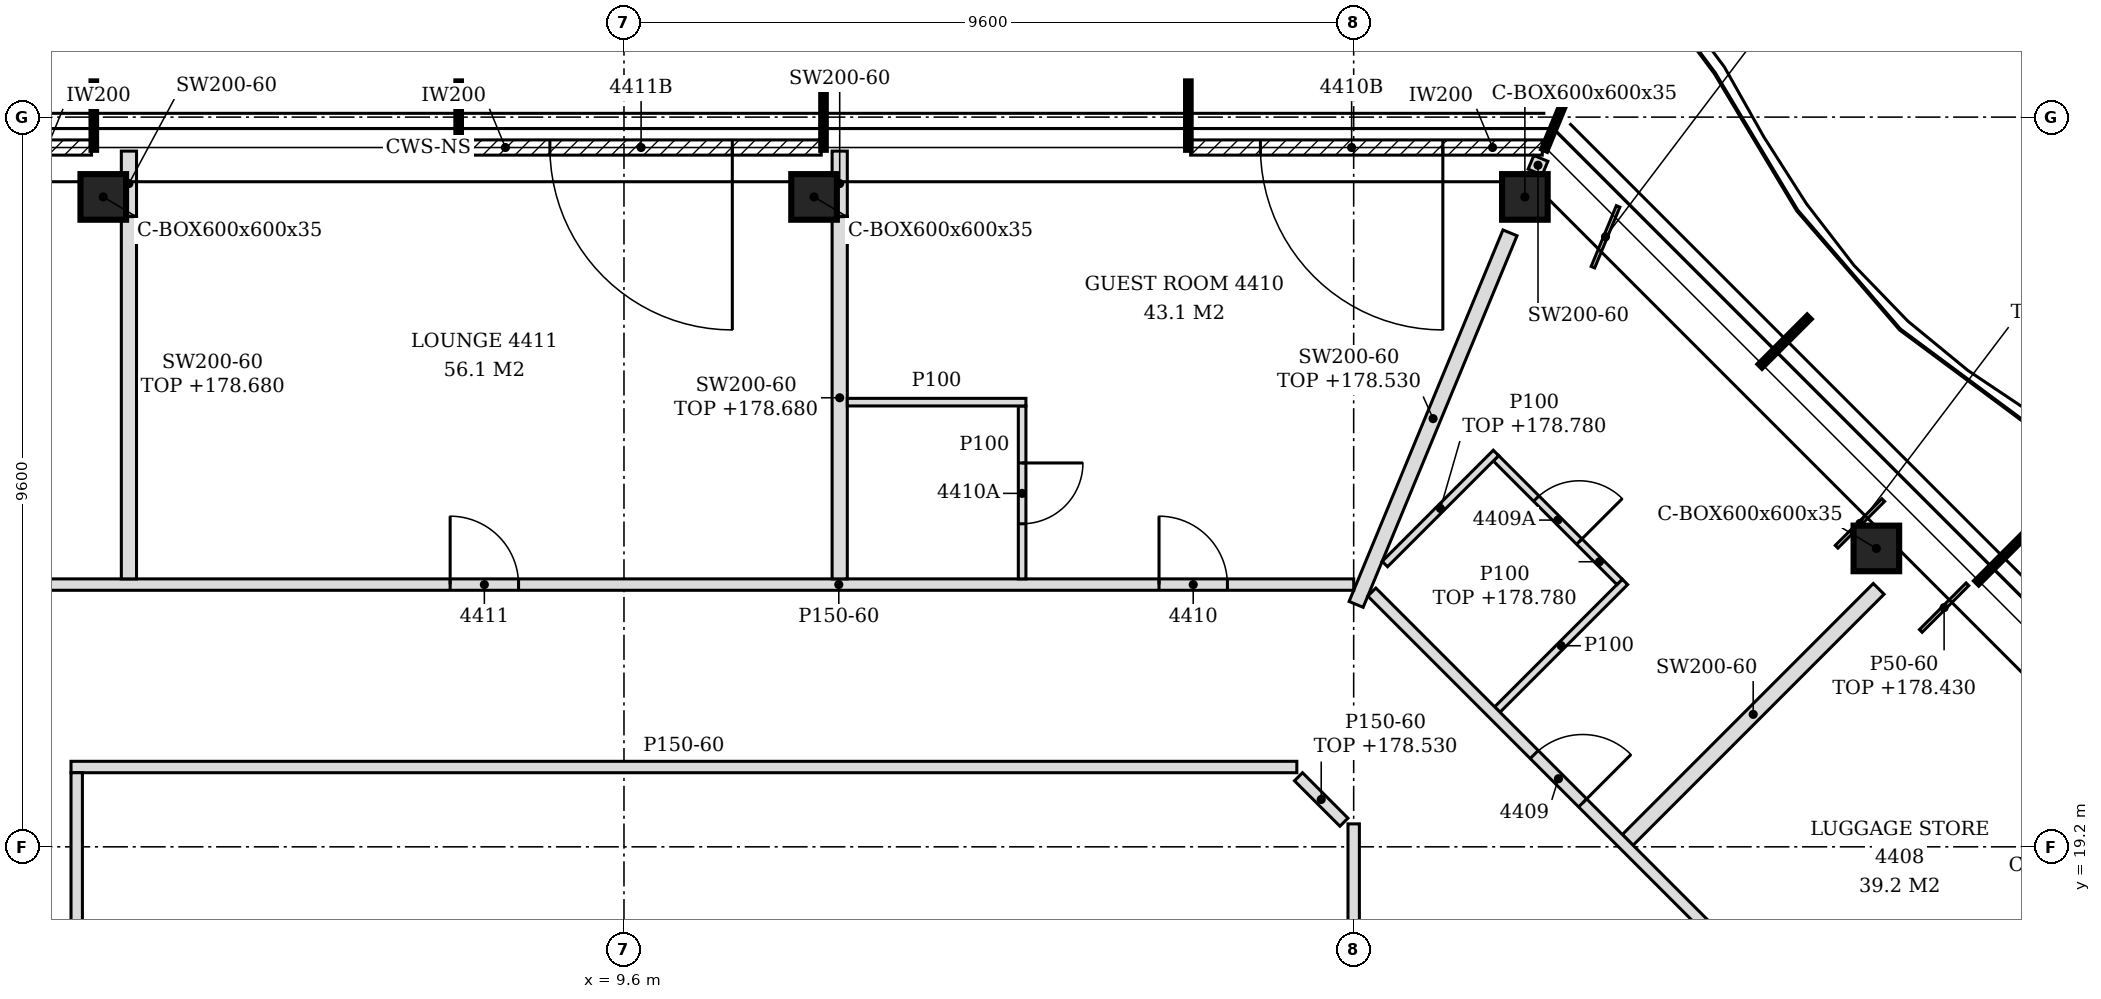
"""IFC4 building model, lengths in metres.
Left out: names, types, materials, properties, quantities, classifications, styles, units other than length and angle.
Written with IfcOpenShell. Run it as: python <this file> out.ifc"""

import sys

from ifc_helpers import new_model, si_unit, direction, frame, frame_2d, origin, origin_2d, place, context, subcontext, project, spatial, polyline, rectangle, hollow_rectangle, outline, extrude, clip, halfspace, element, fill, save


model = new_model("IFC4")
c1 = context("Model", 3, precision=1e-05, world=origin(), true_north=direction((0.0, 1.0)))
c2 = subcontext(c1, "Body", "Model", "MODEL_VIEW")
j1 = project(units=[si_unit("LENGTHUNIT", "METRE"), si_unit("PLANEANGLEUNIT", "RADIAN")], contexts=[c1])
p1 = place(None, origin())
s1 = spatial("IfcSite", under=j1, at=p1, CompositionType="ELEMENT")
p2 = place(p1, origin())
s2 = spatial("IfcBuilding", under=s1, at=p2, CompositionType="ELEMENT")
p3 = place(p2, frame((0.0, 0.0, 175.8)))
s3 = spatial("IfcBuildingStorey", under=s2, at=p3, CompositionType="ELEMENT", Elevation=175.8)
for number, where, z_axis, x_axis in (
    (1, (26.076, 23.126, -0.15), (0.183, -0.122, 0.976), (0.555, 0.832, 0.0)),
    (2, (21.452, 27.75, -0.15), (0.183, -0.122, 0.976), (0.555, 0.832, 0.0)),
    (3, (12.101, 27.75, -0.15), (0.183, -0.122, 0.976), (0.555, 0.832, 0.0)),
    (4, (2.749, 27.75, -0.15), (0.183, -0.122, 0.976), (0.555, 0.832, 0.0)),
):
    element("IfcColumn", number, at=place(p3, frame(where, z_axis=z_axis, x_axis=x_axis)), inside=s3, PredefinedType="COLUMN", context=c2, shape_type="Clipping", body=[
        clip(clip(extrude(hollow_rectangle(XDim=0.6, YDim=0.6, WallThickness=0.035, at=origin_2d()), origin(), (0.0, 0.0, 1.0), 3.69), halfspace(frame((0.0, 0.0, 0.022), z_axis=(0.0, 0.0, 1.0), x_axis=(1.0, 0.0, 0.0)), True)), halfspace(frame((0.0, 0.0, 3.67), z_axis=(0.0, 0.0, 1.0), x_axis=(1.0, 0.0, 0.0)), False)),
    ])
p4 = place(p3, frame((21.681, 28.4, 0.0), z_axis=(0.0, 0.0, 1.0), x_axis=(-1.0, 0.0, 0.0)))
e5 = element("IfcWall", 5, at=p4, inside=s3, PredefinedType="NOTDEFINED", context=c2, shape_type="SweptSolid", body=[
    extrude(rectangle(XDim=4.626, YDim=0.2, at=frame_2d((2.313, 0.0))), origin(), (0.0, 0.0, 1.0), 3.45),
])
p5 = place(p4, frame((1.308, 0.0, 0.0)))
e6 = element("IfcOpeningElement", 6, at=p5, cuts=e5, PredefinedType="OPENING", context=c2, shape_type="SweptSolid", body=[
    extrude(rectangle(XDim=2.4, YDim=2.4, at=frame_2d((1.2, 1.2))), frame((0.0, 0.11, 0.0), z_axis=(0.0, -1.0, 0.0), x_axis=(1.0, 0.0, 0.0)), (0.0, 0.0, 1.0), 0.22),
])
p6 = place(p3, frame((12.195, 28.4, 0.0), z_axis=(0.0, 0.0, 1.0), x_axis=(-1.0, 0.0, 0.0)))
e7 = element("IfcWall", 7, at=p6, inside=s3, PredefinedType="NOTDEFINED", context=c2, shape_type="SweptSolid", body=[
    extrude(rectangle(XDim=4.74, YDim=0.2, at=frame_2d((2.37, 0.0))), origin(), (0.0, 0.0, 1.0), 3.45),
])
p7 = place(p6, frame((1.17, 0.0, 0.0)))
e8 = element("IfcOpeningElement", 8, at=p7, cuts=e7, PredefinedType="OPENING", context=c2, shape_type="SweptSolid", body=[
    extrude(rectangle(XDim=2.4, YDim=2.4, at=frame_2d((1.2, 1.2))), frame((0.0, 0.11, 0.0), z_axis=(0.0, -1.0, 0.0), x_axis=(1.0, 0.0, 0.0)), (0.0, 0.0, 1.0), 0.22),
])
p8 = place(p3, frame((2.595, 28.4, 0.0), z_axis=(0.0, 0.0, 1.0), x_axis=(-1.0, 0.0, 0.0)))
e9 = element("IfcWall", 9, at=p8, inside=s3, PredefinedType="NOTDEFINED", context=c2, shape_type="SweptSolid", body=[
    extrude(rectangle(XDim=4.74, YDim=0.2, at=frame_2d((2.37, 0.0))), origin(), (0.0, 0.0, 1.0), 3.45),
])
p9 = place(p8, frame((1.17, 0.0, 0.0)))
e10 = element("IfcOpeningElement", 10, at=p9, cuts=e9, PredefinedType="OPENING", context=c2, shape_type="SweptSolid", body=[
    extrude(rectangle(XDim=2.4, YDim=2.4, at=frame_2d((1.2, 1.2))), frame((0.0, 0.11, 0.0), z_axis=(0.0, -1.0, 0.0), x_axis=(1.0, 0.0, 0.0)), (0.0, 0.0, 1.0), 0.22),
])
p10 = place(p3, frame((31.072, 10.918, 0.0), z_axis=(0.0, 0.0, 1.0), x_axis=(-0.707106781187, 0.707106781187, 0.0)))
e11 = element("IfcWall", 11, at=p10, inside=s3, PredefinedType="PARTITIONING", context=c2, shape_type="SweptSolid", body=[
    extrude(rectangle(XDim=16.452, YDim=0.15, at=frame_2d((8.226, 0.0))), origin(), (0.0, 0.0, 1.0), 2.88),
])
p11 = place(p10, frame((3.462, 0.0, 0.0)))
e12 = element("IfcOpeningElement", 12, at=p11, cuts=e11, PredefinedType="OPENING", context=c2, shape_type="SweptSolid", body=[
    extrude(rectangle(XDim=0.9, YDim=2.1, at=frame_2d((0.45, 1.05))), frame((0.0, 0.085, 0.0), z_axis=(0.0, -1.0, 0.0), x_axis=(1.0, 0.0, 0.0)), (0.0, 0.0, 1.0), 0.17),
])
p12 = place(p10, frame((8.046, 0.0, 0.0)))
e13 = element("IfcOpeningElement", 13, at=p12, cuts=e11, PredefinedType="OPENING", context=c2, shape_type="SweptSolid", body=[
    extrude(rectangle(XDim=0.9, YDim=2.1, at=frame_2d((0.45, 1.05))), frame((0.0, 0.085, 0.0), z_axis=(0.0, -1.0, 0.0), x_axis=(1.0, 0.0, 0.0)), (0.0, 0.0, 1.0), 0.17),
])
p13 = place(p10, frame((12.53, 0.0, 0.0)))
e14 = element("IfcOpeningElement", 14, at=p13, cuts=e11, PredefinedType="OPENING", context=c2, shape_type="SweptSolid", body=[
    extrude(rectangle(XDim=0.9, YDim=2.1, at=frame_2d((0.45, 1.05))), frame((0.0, 0.085, 0.0), z_axis=(0.0, -1.0, 0.0), x_axis=(1.0, 0.0, 0.0)), (0.0, 0.0, 1.0), 0.17),
])
p14 = place(p3, frame((2.4, 13.275, 0.0), z_axis=(0.0, 0.0, 1.0), x_axis=(0.0, 1.0, 0.0)))
e15 = element("IfcWall", 15, at=p14, inside=s3, PredefinedType="PARTITIONING", context=c2, shape_type="SweptSolid", body=[
    extrude(outline(polyline([(0.0, 0.0), (6.9, 0.0), (6.9, 3.45), (5.43, 3.45), (5.428, 2.88), (5.22, 2.88), (5.218, 3.45), (0.075, 3.45), (0.073, 2.83), (0.0, 2.83), (0.0, 0.0)])), frame((0.0, 0.075, 0.0), z_axis=(0.0, -1.0, 0.0), x_axis=(1.0, 0.0, 0.0)), (0.0, 0.0, 1.0), 0.15),
])
p15 = place(p3, frame((19.2, 15.502, 0.0), z_axis=(0.0, 0.0, 1.0), x_axis=(0.0, 1.0, 0.0)))
e16 = element("IfcWall", 16, at=p15, inside=s3, PredefinedType="PARTITIONING", context=c2, shape_type="SweptSolid", body=[
    extrude(rectangle(XDim=4.0, YDim=0.15, at=frame_2d((2.0, 0.0))), origin(), (0.0, 0.0, 1.0), 2.73),
])
p16 = place(p3, frame((22.805, 19.291, 0.0), z_axis=(0.0, 0.0, 1.0), x_axis=(0.707028369139, 0.70718518454, 0.0)))
e17 = element("IfcWall", 17, at=p16, inside=s3, PredefinedType="PARTITIONING", context=c2, shape_type="SweptSolid", body=[
    extrude(rectangle(XDim=4.671, YDim=0.2, at=frame_2d((2.335, 0.0))), origin(), (0.0, 0.0, 1.0), 3.45),
])
p17 = place(p3, frame((19.072, 19.524, 0.0), z_axis=(0.0, 0.0, 1.0), x_axis=(-0.706962429495, 0.707251103415, 0.0)))
e18 = element("IfcWall", 18, at=p17, inside=s3, PredefinedType="PARTITIONING", context=c2, shape_type="SweptSolid", body=[
    extrude(rectangle(XDim=0.846, YDim=0.15, at=frame_2d((0.423, 0.0))), origin(), (0.0, 0.0, 1.0), 2.73),
])
p18 = place(p3, frame((2.325, 20.25, 0.0), z_axis=(0.0, 0.0, 1.0), x_axis=(1.0, 0.0, 0.0)))
e19 = element("IfcWall", 19, at=p18, inside=s3, PredefinedType="PARTITIONING", context=c2, shape_type="SweptSolid", body=[
    extrude(outline(polyline([(0.0, 0.0), (16.127, 0.0), (16.127, 3.45), (5.025, 3.45), (5.023, 2.73), (4.725, 2.73), (4.723, 3.45), (0.0, 3.45), (0.0, 0.0)])), frame((0.0, 0.075, 0.0), z_axis=(0.0, -1.0, 0.0), x_axis=(1.0, 0.0, 0.0)), (0.0, 0.0, 1.0), 0.15),
])
p19 = place(p3, frame((21.09, 21.006, 0.0), z_axis=(0.0, 0.0, 1.0), x_axis=(0.707106781187, 0.707106781187, 0.0)))
e20 = element("IfcWall", 20, at=p19, inside=s3, PredefinedType="PARTITIONING", context=c2, shape_type="SweptSolid", body=[
    extrude(rectangle(XDim=2.375, YDim=0.1, at=frame_2d((1.188, 0.0))), origin(), (0.0, 0.0, 1.0), 3.45),
])
p20 = place(p3, frame((19.232, 22.389, 0.0), z_axis=(0.0, 0.0, 1.0), x_axis=(0.382645235891, 0.923895353084, 0.0)))
e21 = element("IfcWall", 21, at=p20, inside=s3, PredefinedType="PARTITIONING", context=c2, shape_type="SweptSolid", body=[
    extrude(rectangle(XDim=5.291, YDim=0.2, at=frame_2d((2.645, 0.0))), origin(), (0.0, 0.0, 1.0), 2.73),
])
p21 = place(p3, frame((-4.351, 22.65, 0.0), z_axis=(0.0, 0.0, 1.0), x_axis=(1.0, 0.0, 0.0)))
e22 = element("IfcWall", 22, at=p21, inside=s3, PredefinedType="PARTITIONING", context=c2, shape_type="SweptSolid", body=[
    extrude(outline(polyline([(0.0, 0.0), (23.551, 0.0), (23.552, 2.73), (23.401, 2.73), (23.399, 3.45), (11.701, 3.45), (11.699, 2.73), (11.401, 2.73), (11.399, 3.45), (0.0, 3.45), (0.0, 0.0)])), frame((0.0, 0.075, 0.0), z_axis=(0.0, -1.0, 0.0), x_axis=(1.0, 0.0, 0.0)), (0.0, 0.0, 1.0), 0.15),
])
p22 = place(p21, frame((20.99, 0.0, 0.0)))
e23 = element("IfcOpeningElement", 23, at=p22, cuts=e22, PredefinedType="OPENING", context=c2, shape_type="SweptSolid", body=[
    extrude(rectangle(XDim=0.9, YDim=2.1, at=frame_2d((0.45, 1.05))), frame((0.0, 0.085, 0.0), z_axis=(0.0, -1.0, 0.0), x_axis=(1.0, 0.0, 0.0)), (0.0, 0.0, 1.0), 0.17),
])
p23 = place(p21, frame((11.664, 0.0, 0.0)))
e24 = element("IfcOpeningElement", 24, at=p23, cuts=e22, PredefinedType="OPENING", context=c2, shape_type="SweptSolid", body=[
    extrude(rectangle(XDim=0.9, YDim=2.1, at=frame_2d((0.45, 1.05))), frame((0.0, 0.085, 0.0), z_axis=(0.0, -1.0, 0.0), x_axis=(1.0, 0.0, 0.0)), (0.0, 0.0, 1.0), 0.17),
])
p24 = place(p21, frame((4.399, 0.0, 0.0)))
e25 = element("IfcOpeningElement", 25, at=p24, cuts=e22, PredefinedType="OPENING", context=c2, shape_type="SweptSolid", body=[
    extrude(rectangle(XDim=0.9, YDim=2.1, at=frame_2d((0.45, 1.05))), frame((0.0, 0.085, 0.0), z_axis=(0.0, -1.0, 0.0), x_axis=(1.0, 0.0, 0.0)), (0.0, 0.0, 1.0), 0.17),
])
p25 = place(p3, frame((3.087, 22.725, 0.0), z_axis=(0.0, 0.0, 1.0), x_axis=(0.0, 1.0, 0.0)))
e26 = element("IfcWall", 26, at=p25, inside=s3, PredefinedType="PARTITIONING", context=c2, shape_type="SweptSolid", body=[
    extrude(outline(polyline([(0.0, 0.0), (4.766, 0.0), (4.478, 0.863), (4.373, 1.725), (4.373, 2.587), (4.373, 2.88), (0.0, 2.88), (0.0, 2.587), (0.0, 1.725), (0.0, 0.863), (0.0, 0.0)])), frame((0.0, 0.1, 0.0), z_axis=(0.0, -1.0, 0.0), x_axis=(1.0, 0.0, 0.0)), (0.0, 0.0, 1.0), 0.2),
])
p26 = place(p3, frame((12.438, 22.725, 0.0), z_axis=(0.0, 0.0, 1.0), x_axis=(0.0, 1.0, 0.0)))
e27 = element("IfcWall", 27, at=p26, inside=s3, PredefinedType="PARTITIONING", context=c2, shape_type="SweptSolid", body=[
    extrude(outline(polyline([(0.0, 0.0), (4.766, 0.0), (4.478, 0.863), (4.373, 1.725), (4.373, 2.587), (4.373, 2.88), (0.0, 2.88), (0.0, 2.587), (0.0, 1.725), (0.0, 0.863), (0.0, 0.0)])), frame((0.0, 0.1, 0.0), z_axis=(0.0, -1.0, 0.0), x_axis=(1.0, 0.0, 0.0)), (0.0, 0.0, 1.0), 0.2),
])
p27 = place(p3, frame((14.838, 22.725, 0.0), z_axis=(0.0, 0.0, 1.0), x_axis=(0.0, 1.0, 0.0)))
e28 = element("IfcWall", 28, at=p27, inside=s3, PredefinedType="PARTITIONING", context=c2, shape_type="SweptSolid", body=[
    extrude(outline(polyline([(0.0, 0.0), (2.275, 0.0), (2.275, 3.45), (0.78, 3.45), (0.778, 2.88), (0.57, 2.88), (0.568, 3.45), (0.0, 3.45), (0.0, 0.0)])), frame((0.0, 0.05, 0.0), z_axis=(0.0, -1.0, 0.0), x_axis=(1.0, 0.0, 0.0)), (0.0, 0.0, 1.0), 0.1),
])
p28 = place(p27, frame((0.725, 0.0, 0.0)))
e29 = element("IfcOpeningElement", 29, at=p28, cuts=e28, PredefinedType="OPENING", context=c2, shape_type="SweptSolid", body=[
    extrude(rectangle(XDim=0.8, YDim=2.1, at=frame_2d((0.4, 1.05))), frame((0.0, 0.06, 0.0), z_axis=(0.0, -1.0, 0.0), x_axis=(1.0, 0.0, 0.0)), (0.0, 0.0, 1.0), 0.12),
])
p29 = place(p3, frame((22.698, 22.685, 0.0), z_axis=(0.0, 0.0, 1.0), x_axis=(-0.707053697085, 0.707159861304, 0.0)))
e30 = element("IfcWall", 30, at=p29, inside=s3, PredefinedType="PARTITIONING", context=c2, shape_type="SweptSolid", body=[
    extrude(rectangle(XDim=2.3, YDim=0.1, at=frame_2d((1.15, 0.0))), origin(), (0.0, 0.0, 1.0), 2.98),
])
p30 = place(p29, frame((0.75, 0.0, 0.0)))
e31 = element("IfcOpeningElement", 31, at=p30, cuts=e30, PredefinedType="OPENING", context=c2, shape_type="SweptSolid", body=[
    extrude(rectangle(XDim=0.8, YDim=2.1, at=frame_2d((0.4, 1.05))), frame((0.0, 0.06, 0.0), z_axis=(0.0, -1.0, 0.0), x_axis=(1.0, 0.0, 0.0)), (0.0, 0.0, 1.0), 0.12),
])
p31 = place(p3, frame((19.61, 22.92, 0.0), z_axis=(0.0, 0.0, 1.0), x_axis=(0.707106781187, 0.707106781187, 0.0)))
e32 = element("IfcWall", 32, at=p31, inside=s3, PredefinedType="PARTITIONING", context=c2, shape_type="SweptSolid", body=[
    extrude(rectangle(XDim=2.068, YDim=0.1, at=frame_2d((1.034, 0.0))), origin(), (0.0, 0.0, 1.0), 2.98),
])
p32 = place(p3, frame((12.538, 25.05, 0.0), z_axis=(0.0, 0.0, 1.0), x_axis=(1.0, 0.0, 0.0)))
e33 = element("IfcWall", 33, at=p32, inside=s3, PredefinedType="PARTITIONING", context=c2, shape_type="SweptSolid", body=[
    extrude(rectangle(XDim=2.35, YDim=0.1, at=frame_2d((1.175, 0.0))), origin(), (0.0, 0.0, 1.0), 3.45),
])
p33 = place(p3, frame((3.087, 27.498, 0.0), z_axis=(0.0, 0.0, 1.0), x_axis=(0.0, 1.0, 0.0)))
e34 = element("IfcWall", 34, at=p33, inside=s3, PredefinedType="PARTITIONING", context=c2, shape_type="SweptSolid", body=[
    extrude(outline(polyline([(0.454, 0.0), (0.854, 0.0), (0.854, 0.863), (0.854, 1.725), (0.854, 2.587), (0.854, 3.45), (0.0, 3.45), (0.33, 2.587), (0.438, 1.725), (0.454, 0.863), (0.454, 0.0)])), frame((0.0, 0.1, 0.0), z_axis=(0.0, -1.0, 0.0), x_axis=(1.0, 0.0, 0.0)), (0.0, 0.0, 1.0), 0.2),
])
p34 = place(p3, frame((12.438, 27.498, 0.0), z_axis=(0.0, 0.0, 1.0), x_axis=(0.0, 1.0, 0.0)))
e35 = element("IfcWall", 35, at=p34, inside=s3, PredefinedType="PARTITIONING", context=c2, shape_type="SweptSolid", body=[
    extrude(outline(polyline([(0.455, 0.0), (0.855, 0.0), (0.855, 0.863), (0.855, 1.725), (0.855, 2.587), (0.855, 3.45), (0.0, 3.45), (0.33, 2.587), (0.438, 1.725), (0.455, 0.863), (0.455, 0.0)])), frame((0.0, 0.1, 0.0), z_axis=(0.0, -1.0, 0.0), x_axis=(1.0, 0.0, 0.0)), (0.0, 0.0, 1.0), 0.2),
])
p35 = place(p3, frame((21.588, 28.077, 0.0), z_axis=(0.0, 0.0, 1.0), x_axis=(0.382572635919, 0.923925418119, 0.0)))
e36 = element("IfcWall", 36, at=p35, inside=s3, PredefinedType="PARTITIONING", context=c2, shape_type="SweptSolid", body=[
    extrude(rectangle(XDim=0.195, YDim=0.2, at=frame_2d((0.098, 0.0))), origin(), (0.0, 0.0, 1.0), 3.45),
])
p36 = place(p3, frame((25.553, 23.147, 0.0), z_axis=(0.0, 0.0, 1.0), x_axis=(0.706966105416, 0.707247428976, 0.0)))
e37 = element("IfcWall", 37, at=p36, inside=s3, PredefinedType="PARTITIONING", context=c2, shape_type="SweptSolid", body=[
    extrude(rectangle(XDim=0.868, YDim=0.05, at=frame_2d((0.434, 0.0))), origin(), (0.0, 0.0, 1.0), 2.93),
])
p37 = place(p3, frame((26.661, 22.04, 0.0), z_axis=(0.0, 0.0, 1.0), x_axis=(0.707106781187, 0.707106781187, 0.0)))
e38 = element("IfcWall", 38, at=p37, inside=s3, PredefinedType="PARTITIONING", context=c2, shape_type="SweptSolid", body=[
    extrude(rectangle(XDim=0.868, YDim=0.05, at=frame_2d((0.434, 0.0))), origin(), (0.0, 0.0, 1.0), 2.63),
])
p38 = place(p3, frame((22.347, 26.826, 0.0), z_axis=(0.0, 0.0, 1.0), x_axis=(0.382551127662, 0.923934323815, 0.0)))
e39 = element("IfcWall", 39, at=p38, inside=s3, PredefinedType="PARTITIONING", context=c2, shape_type="SweptSolid", body=[
    extrude(rectangle(XDim=0.865, YDim=0.05, at=frame_2d((0.433, 0.0))), origin(), (0.0, 0.0, 1.0), 2.93),
])
p39 = place(p5, origin())
e40 = element("IfcDoor", 40, at=p39, inside=s3, OperationType="SINGLE_SWING_LEFT", PredefinedType="DOOR", context=c2, shape_type="SweptSolid", body=[
    extrude(rectangle(XDim=2.4, YDim=2.4, at=frame_2d((1.2, 1.2))), frame((0.0, 0.025, 0.0), z_axis=(0.0, -1.0, 0.0), x_axis=(1.0, 0.0, 0.0)), (0.0, 0.0, 1.0), 0.05),
])
fill(e6, e40)
p40 = place(p7, origin())
e41 = element("IfcDoor", 41, at=p40, inside=s3, OperationType="SINGLE_SWING_LEFT", PredefinedType="DOOR", context=c2, shape_type="SweptSolid", body=[
    extrude(rectangle(XDim=2.4, YDim=2.4, at=frame_2d((1.2, 1.2))), frame((0.0, 0.025, 0.0), z_axis=(0.0, -1.0, 0.0), x_axis=(1.0, 0.0, 0.0)), (0.0, 0.0, 1.0), 0.05),
])
fill(e8, e41)
p41 = place(p13, frame((0.9, 0.0, 0.0), z_axis=(0.0, 0.0, 1.0), x_axis=(-1.0, 0.0, 0.0)))
e42 = element("IfcDoor", 42, at=p41, inside=s3, OperationType="SINGLE_SWING_RIGHT", PredefinedType="DOOR", context=c2, shape_type="SweptSolid", body=[
    extrude(rectangle(XDim=0.9, YDim=2.1, at=frame_2d((0.45, 1.05))), frame((0.0, 0.025, 0.0), z_axis=(0.0, -1.0, 0.0), x_axis=(1.0, 0.0, 0.0)), (0.0, 0.0, 1.0), 0.05),
])
fill(e14, e42)
p42 = place(p30, frame((0.8, 0.0, 0.0), z_axis=(0.0, 0.0, 1.0), x_axis=(-1.0, 0.0, 0.0)))
e43 = element("IfcDoor", 43, at=p42, inside=s3, OperationType="SINGLE_SWING_RIGHT", PredefinedType="DOOR", context=c2, shape_type="SweptSolid", body=[
    extrude(rectangle(XDim=0.8, YDim=2.1, at=frame_2d((0.4, 1.05))), frame((0.0, 0.025, 0.0), z_axis=(0.0, -1.0, 0.0), x_axis=(1.0, 0.0, 0.0)), (0.0, 0.0, 1.0), 0.05),
])
fill(e31, e43)
p43 = place(p22, origin())
e44 = element("IfcDoor", 44, at=p43, inside=s3, OperationType="SINGLE_SWING_LEFT", PredefinedType="DOOR", context=c2, shape_type="SweptSolid", body=[
    extrude(rectangle(XDim=0.9, YDim=2.1, at=frame_2d((0.45, 1.05))), frame((0.0, 0.025, 0.0), z_axis=(0.0, -1.0, 0.0), x_axis=(1.0, 0.0, 0.0)), (0.0, 0.0, 1.0), 0.05),
])
fill(e23, e44)
p44 = place(p28, frame((0.8, 0.0, 0.0), z_axis=(0.0, 0.0, 1.0), x_axis=(-1.0, 0.0, 0.0)))
e45 = element("IfcDoor", 45, at=p44, inside=s3, OperationType="SINGLE_SWING_LEFT", PredefinedType="DOOR", context=c2, shape_type="SweptSolid", body=[
    extrude(rectangle(XDim=0.8, YDim=2.1, at=frame_2d((0.4, 1.05))), frame((0.0, 0.025, 0.0), z_axis=(0.0, -1.0, 0.0), x_axis=(1.0, 0.0, 0.0)), (0.0, 0.0, 1.0), 0.05),
])
fill(e29, e45)
p45 = place(p23, origin())
e46 = element("IfcDoor", 46, at=p45, inside=s3, OperationType="SINGLE_SWING_LEFT", PredefinedType="DOOR", context=c2, shape_type="SweptSolid", body=[
    extrude(rectangle(XDim=0.9, YDim=2.1, at=frame_2d((0.45, 1.05))), frame((0.0, 0.025, 0.0), z_axis=(0.0, -1.0, 0.0), x_axis=(1.0, 0.0, 0.0)), (0.0, 0.0, 1.0), 0.05),
])
fill(e24, e46)
save(model, sys.argv[1])
